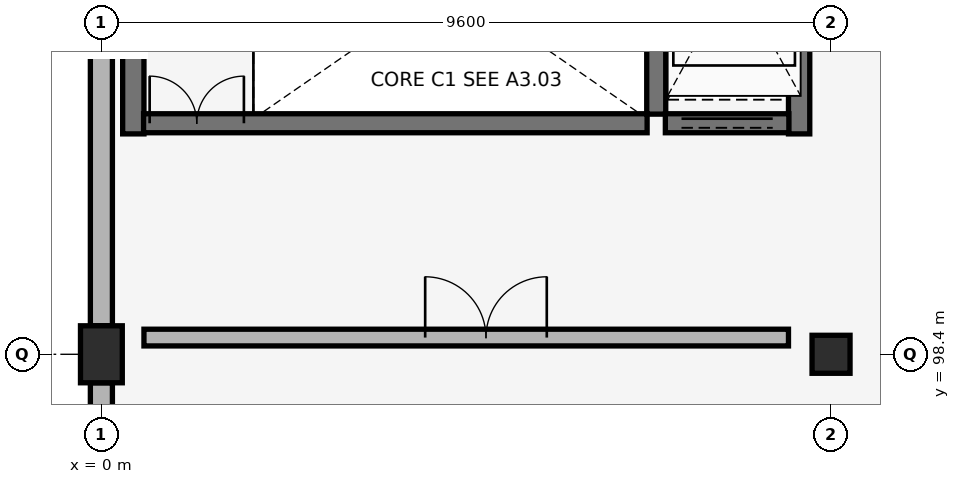
"""IFC4 building model, lengths in metres.
Left out: names, types, materials, properties, quantities, classifications, styles, units other than length and angle.
Written with IfcOpenShell. Run it as: python <this file> out.ifc"""

import sys

from ifc_helpers import new_model, si_unit, direction, frame, frame_2d, origin, origin_2d, place, context, subcontext, project, spatial, rectangle, extrude, element, fill, save


model = new_model("IFC4")
c1 = context("Model", 3, precision=1e-05, world=origin(), true_north=direction((0.0, 1.0)))
c2 = subcontext(c1, "Body", "Model", "MODEL_VIEW")
j1 = project(units=[si_unit("LENGTHUNIT", "METRE"), si_unit("PLANEANGLEUNIT", "RADIAN")], contexts=[c1])
p1 = place(None, origin())
s1 = spatial("IfcSite", under=j1, at=p1, CompositionType="ELEMENT")
p2 = place(p1, origin())
s2 = spatial("IfcBuilding", under=s1, at=p2, CompositionType="ELEMENT")
p3 = place(p2, frame((0.0, 0.0, 20.74)))
s3 = spatial("IfcBuildingStorey", under=s2, at=p3, CompositionType="ELEMENT", Elevation=20.74)
p4 = place(p3, frame((0.0, 98.4, 0.0), z_axis=(0.0, 0.0, 1.0), x_axis=(1.0, 0.0, 0.0)))
e1 = element("IfcColumn", 1, at=p4, inside=s3, PredefinedType="COLUMN", context=c2, shape_type="SweptSolid", body=[
    extrude(rectangle(XDim=0.55, YDim=0.75, at=origin_2d()), origin(), (0.0, 0.0, 1.0), 4.08),
])
p5 = place(p3, frame((9.6, 98.4, 0.0), z_axis=(0.0, 0.0, 1.0), x_axis=(1.0, 0.0, 0.0)))
e2 = element("IfcColumn", 2, at=p5, inside=s3, PredefinedType="COLUMN", context=c2, shape_type="SweptSolid", body=[
    extrude(rectangle(XDim=0.5, YDim=0.5, at=origin_2d()), origin(), (0.0, 0.0, 1.0), 4.08),
])
p6 = place(p3, frame((0.0, 98.025, 0.0), z_axis=(0.0, 0.0, 1.0), x_axis=(0.0, -1.0, 0.0)))
e3 = element("IfcWall", 3, at=p6, inside=s3, PredefinedType="SOLIDWALL", context=c2, shape_type="SweptSolid", body=[
    extrude(rectangle(XDim=6.45, YDim=0.29, at=frame_2d((3.225, 0.0))), origin(), (0.0, 0.0, 1.0), 3.07),
])
p7 = place(p6, frame((1.103, 0.0, 0.88)))
e4 = element("IfcOpeningElement", 4, at=p7, cuts=e3, PredefinedType="OPENING", context=c2, shape_type="SweptSolid", body=[
    extrude(rectangle(XDim=1.02, YDim=1.88, at=frame_2d((0.51, 0.94))), frame((0.0, 0.155, 0.0), z_axis=(0.0, -1.0, 0.0), x_axis=(1.0, 0.0, 0.0)), (0.0, 0.0, 1.0), 0.31),
])
p8 = place(p6, frame((2.715, 0.0, 0.88)))
e5 = element("IfcOpeningElement", 5, at=p8, cuts=e3, PredefinedType="OPENING", context=c2, shape_type="SweptSolid", body=[
    extrude(rectangle(XDim=1.02, YDim=1.88, at=frame_2d((0.51, 0.94))), frame((0.0, 0.155, 0.0), z_axis=(0.0, -1.0, 0.0), x_axis=(1.0, 0.0, 0.0)), (0.0, 0.0, 1.0), 0.31),
])
p9 = place(p6, frame((4.327, 0.0, 0.88)))
e6 = element("IfcOpeningElement", 6, at=p9, cuts=e3, PredefinedType="OPENING", context=c2, shape_type="SweptSolid", body=[
    extrude(rectangle(XDim=1.02, YDim=1.88, at=frame_2d((0.51, 0.94))), frame((0.0, 0.155, 0.0), z_axis=(0.0, -1.0, 0.0), x_axis=(1.0, 0.0, 0.0)), (0.0, 0.0, 1.0), 0.31),
])
p10 = place(p3, frame((0.0, 105.225, 0.0), z_axis=(0.0, 0.0, 1.0), x_axis=(0.0, -1.0, 0.0)))
e7 = element("IfcWall", 7, at=p10, inside=s3, PredefinedType="SOLIDWALL", context=c2, shape_type="SweptSolid", body=[
    extrude(rectangle(XDim=6.45, YDim=0.29, at=frame_2d((3.225, 0.0))), origin(), (0.0, 0.0, 1.0), 3.07),
])
for number, where, z_axis, x_axis in (
    (8, (0.42, 101.3, 0.0), (0.0, 0.0, 1.0), (0.0, 1.0, 0.0)),
    (9, (9.18, 101.3, 0.0), (0.0, 0.0, 1.0), (0.0, 1.0, 0.0)),
):
    element("IfcWall", number, at=place(p3, frame(where, z_axis=z_axis, x_axis=x_axis)), inside=s3, PredefinedType="SHEAR", context=c2, shape_type="SweptSolid", body=[
        extrude(rectangle(XDim=4.08, YDim=0.28, at=frame_2d((2.04, 0.0))), origin(), (0.0, 0.0, 1.0), 3.8),
    ])
p11 = place(p3, frame((7.3, 101.56, 0.0), z_axis=(0.0, 0.0, 1.0), x_axis=(0.0, 1.0, 0.0)))
e10 = element("IfcWall", 10, at=p11, inside=s3, PredefinedType="SHEAR", context=c2, shape_type="SweptSolid", body=[
    extrude(rectangle(XDim=3.54, YDim=0.25, at=frame_2d((1.77, 0.0))), origin(), (0.0, 0.0, 1.0), 3.8),
])
p12 = place(p3, frame((0.555, 101.44, 0.0), z_axis=(0.0, 0.0, 1.0), x_axis=(1.0, 0.0, 0.0)))
e11 = element("IfcWall", 11, at=p12, inside=s3, PredefinedType="SHEAR", context=c2, shape_type="SweptSolid", body=[
    extrude(rectangle(XDim=6.625, YDim=0.25, at=frame_2d((3.312, 0.0))), origin(), (0.0, 0.0, 1.0), 3.8),
])
p13 = place(p12, frame((0.08, 0.0, 0.0)))
e12 = element("IfcOpeningElement", 12, at=p13, cuts=e11, PredefinedType="OPENING", context=c2, shape_type="SweptSolid", body=[
    extrude(rectangle(XDim=1.24, YDim=2.15, at=frame_2d((0.62, 1.075))), frame((0.0, 0.135, 0.0), z_axis=(0.0, -1.0, 0.0), x_axis=(1.0, 0.0, 0.0)), (0.0, 0.0, 1.0), 0.27),
])
p14 = place(p3, frame((0.56, 98.62, 0.0), z_axis=(0.0, 0.0, 1.0), x_axis=(1.0, 0.0, 0.0)))
e13 = element("IfcWall", 13, at=p14, inside=s3, PredefinedType="PARTITIONING", context=c2, shape_type="SweptSolid", body=[
    extrude(rectangle(XDim=8.48, YDim=0.22, at=frame_2d((4.24, 0.0))), origin(), (0.0, 0.0, 1.0), 3.17),
])
p15 = place(p14, frame((3.7, 0.0, 0.0)))
e14 = element("IfcOpeningElement", 14, at=p15, cuts=e13, PredefinedType="OPENING", context=c2, shape_type="SweptSolid", body=[
    extrude(rectangle(XDim=1.6, YDim=2.2, at=frame_2d((0.8, 1.1))), frame((0.0, 0.12, 0.0), z_axis=(0.0, -1.0, 0.0), x_axis=(1.0, 0.0, 0.0)), (0.0, 0.0, 1.0), 0.24),
])
p16 = place(p3, frame((7.42, 101.44, 0.0), z_axis=(0.0, 0.0, 1.0), x_axis=(1.0, 0.0, 0.0)))
e15 = element("IfcWall", 15, at=p16, inside=s3, PredefinedType="SHEAR", context=c2, shape_type="SweptSolid", body=[
    extrude(rectangle(XDim=1.625, YDim=0.25, at=frame_2d((0.812, 0.0))), origin(), (0.0, 0.0, 1.0), 3.8),
])
p17 = place(p16, frame((0.212, 0.0, 0.0)))
e16 = element("IfcOpeningElement", 16, at=p17, cuts=e15, PredefinedType="OPENING", context=c2, shape_type="SweptSolid", body=[
    extrude(rectangle(XDim=1.2, YDim=2.15, at=frame_2d((0.6, 1.075))), frame((0.0, 0.135, 0.0), z_axis=(0.0, -1.0, 0.0), x_axis=(1.0, 0.0, 0.0)), (0.0, 0.0, 1.0), 0.27),
])
p18 = place(p13, origin())
e17 = element("IfcDoor", 17, at=p18, inside=s3, OperationType="DOUBLE_DOOR_SINGLE_SWING", PredefinedType="DOOR", context=c2, shape_type="SweptSolid", body=[
    extrude(rectangle(XDim=1.24, YDim=2.15, at=frame_2d((0.62, 1.075))), frame((0.0, 0.025, 0.0), z_axis=(0.0, -1.0, 0.0), x_axis=(1.0, 0.0, 0.0)), (0.0, 0.0, 1.0), 0.05),
])
fill(e12, e17)
p19 = place(p15, origin())
e18 = element("IfcDoor", 18, at=p19, inside=s3, OperationType="DOUBLE_DOOR_SINGLE_SWING", PredefinedType="DOOR", context=c2, shape_type="SweptSolid", body=[
    extrude(rectangle(XDim=1.6, YDim=2.2, at=frame_2d((0.8, 1.1))), frame((0.0, 0.025, 0.0), z_axis=(0.0, -1.0, 0.0), x_axis=(1.0, 0.0, 0.0)), (0.0, 0.0, 1.0), 0.05),
])
fill(e14, e18)
p20 = place(p17, origin())
e19 = element("IfcDoor", 19, at=p20, inside=s3, OperationType="DOUBLE_DOOR_SLIDING", PredefinedType="DOOR", context=c2, shape_type="SweptSolid", body=[
    extrude(rectangle(XDim=1.2, YDim=2.15, at=frame_2d((0.6, 1.075))), frame((0.0, 0.025, 0.0), z_axis=(0.0, -1.0, 0.0), x_axis=(1.0, 0.0, 0.0)), (0.0, 0.0, 1.0), 0.05),
])
fill(e16, e19)
save(model, sys.argv[1])
